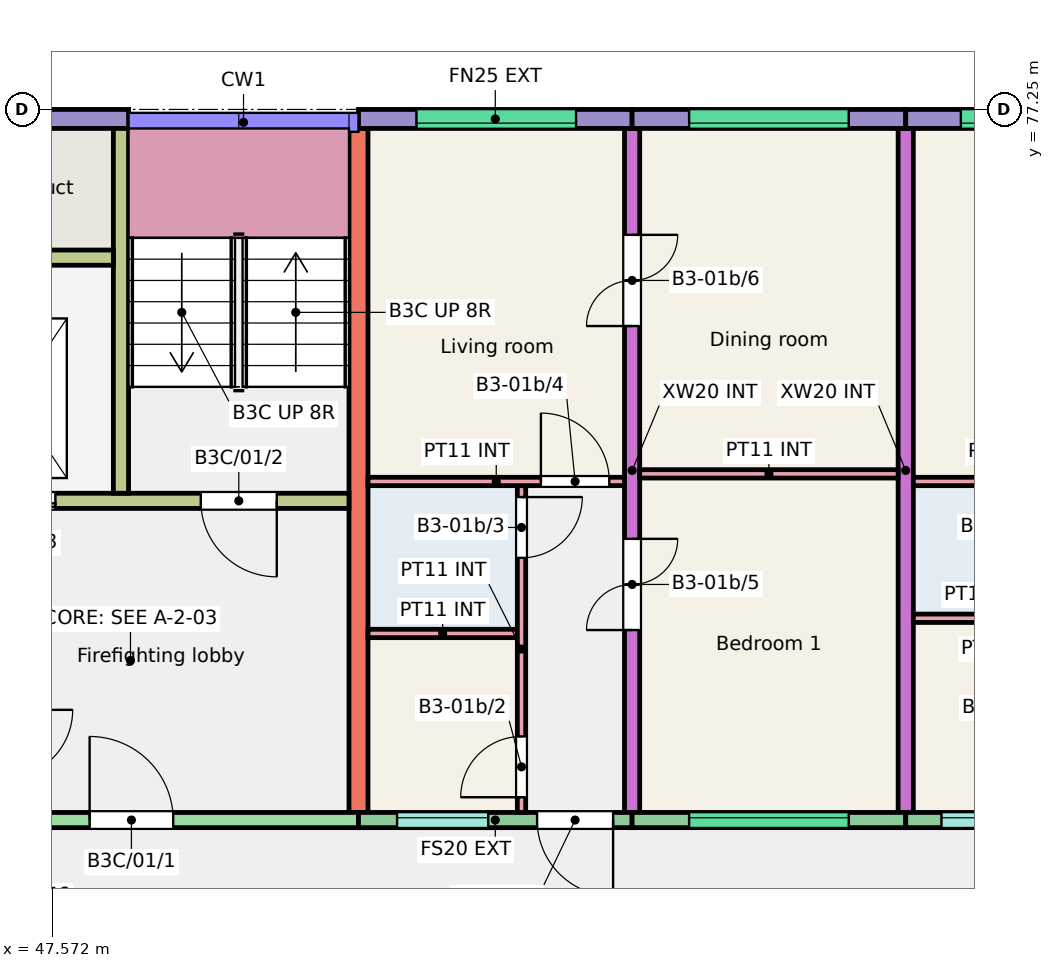
"""IFC4 building model, lengths in metres.
Left out: names, types, materials, properties, quantities, classifications, styles, units other than length and angle.
Written with IfcOpenShell. Run it as: python <this file> out.ifc"""

import sys

from ifc_helpers import new_model, si_unit, direction, frame, frame_2d, origin, place, context, subcontext, project, spatial, rectangle, extrude, element, fill, save


model = new_model("IFC4")
c1 = context("Model", 3, precision=1e-05, world=origin(), true_north=direction((0.0, 1.0)))
c2 = subcontext(c1, "Body", "Model", "MODEL_VIEW")
j1 = project(units=[si_unit("LENGTHUNIT", "METRE"), si_unit("PLANEANGLEUNIT", "RADIAN")], contexts=[c1])
p1 = place(None, origin())
s1 = spatial("IfcSite", under=j1, at=p1, CompositionType="ELEMENT")
p2 = place(p1, origin())
s2 = spatial("IfcBuilding", under=s1, at=p2, CompositionType="ELEMENT")
p3 = place(p2, frame((0.0, 0.0, 3.0)))
s3 = spatial("IfcBuildingStorey", under=s2, at=p3, CompositionType="ELEMENT", Elevation=3.0)
p4 = place(p3, frame((51.6, 68.0, 0.0), z_axis=(0.0, 0.0, 1.0), x_axis=(0.0, 1.0, 0.0)))
e1 = element("IfcWall", 1, at=p4, inside=s3, PredefinedType="SHEAR", context=c2, shape_type="SweptSolid", body=[
    extrude(rectangle(XDim=9.0, YDim=0.25, at=frame_2d((4.5, 0.0))), origin(), (0.0, 0.0, 1.0), 3.0),
])
p5 = place(p3, frame((55.2, 68.0, 0.0), z_axis=(0.0, 0.0, 1.0), x_axis=(0.0, 1.0, 0.0)))
e2 = element("IfcWall", 2, at=p5, inside=s3, PredefinedType="SHEAR", context=c2, shape_type="SweptSolid", body=[
    extrude(rectangle(XDim=9.0, YDim=0.2, at=frame_2d((4.5, 0.0))), origin(), (0.0, 0.0, 1.0), 3.0),
])
p6 = place(p5, frame((2.4, 0.0, 0.0)))
e3 = element("IfcOpeningElement", 3, at=p6, cuts=e2, PredefinedType="OPENING", context=c2, shape_type="SweptSolid", body=[
    extrude(rectangle(XDim=1.2, YDim=2.1, at=frame_2d((0.6, 1.05))), frame((0.0, 0.11, 0.0), z_axis=(0.0, -1.0, 0.0), x_axis=(1.0, 0.0, 0.0)), (0.0, 0.0, 1.0), 0.22),
])
p7 = place(p5, frame((6.4, 0.0, 0.0)))
e4 = element("IfcOpeningElement", 4, at=p7, cuts=e2, PredefinedType="OPENING", context=c2, shape_type="SweptSolid", body=[
    extrude(rectangle(XDim=1.2, YDim=2.1, at=frame_2d((0.6, 1.05))), frame((0.0, 0.11, 0.0), z_axis=(0.0, -1.0, 0.0), x_axis=(1.0, 0.0, 0.0)), (0.0, 0.0, 1.0), 0.22),
])
p8 = place(p3, frame((58.8, 68.0, 0.0), z_axis=(0.0, 0.0, 1.0), x_axis=(0.0, 1.0, 0.0)))
e5 = element("IfcWall", 5, at=p8, inside=s3, PredefinedType="SHEAR", context=c2, shape_type="SweptSolid", body=[
    extrude(rectangle(XDim=9.0, YDim=0.2, at=frame_2d((4.5, 0.0))), origin(), (0.0, 0.0, 1.0), 3.0),
])
p9 = place(p3, frame((45.6, 77.125, 0.0), z_axis=(0.0, 0.0, 1.0), x_axis=(1.0, 0.0, 0.0)))
e6 = element("IfcWall", 6, at=p9, inside=s3, PredefinedType="SOLIDWALL", context=c2, shape_type="SweptSolid", body=[
    extrude(rectangle(XDim=2.975, YDim=0.25, at=frame_2d((1.487, 0.0))), origin(), (0.0, 0.0, 1.0), 3.0),
])
p10 = place(p3, frame((45.75, 67.9, 0.0), z_axis=(0.0, 0.0, 1.0), x_axis=(1.0, 0.0, 0.0)))
e7 = element("IfcWall", 7, at=p10, inside=s3, PredefinedType="SHEAR", context=c2, shape_type="SweptSolid", body=[
    extrude(rectangle(XDim=5.85, YDim=0.2, at=frame_2d((2.925, 0.0))), origin(), (0.0, 0.0, 1.0), 3.0),
])
p11 = place(p10, frame((2.312, 0.0, 0.0)))
e8 = element("IfcOpeningElement", 8, at=p11, cuts=e7, PredefinedType="OPENING", context=c2, shape_type="SweptSolid", body=[
    extrude(rectangle(XDim=1.1, YDim=2.1, at=frame_2d((0.55, 1.05))), frame((0.0, 0.11, 0.0), z_axis=(0.0, -1.0, 0.0), x_axis=(1.0, 0.0, 0.0)), (0.0, 0.0, 1.0), 0.22),
])
p12 = place(p3, frame((45.75, 72.1, 0.0), z_axis=(0.0, 0.0, 1.0), x_axis=(1.0, 0.0, 0.0)))
e9 = element("IfcWall", 9, at=p12, inside=s3, PredefinedType="SHEAR", context=c2, shape_type="SweptSolid", body=[
    extrude(rectangle(XDim=5.725, YDim=0.2, at=frame_2d((2.863, 0.0))), origin(), (0.0, 0.0, 1.0), 3.0),
])
p13 = place(p12, frame((3.775, 0.0, 0.0)))
e10 = element("IfcOpeningElement", 10, at=p13, cuts=e9, PredefinedType="OPENING", context=c2, shape_type="SweptSolid", body=[
    extrude(rectangle(XDim=1.0, YDim=2.1, at=frame_2d((0.5, 1.05))), frame((0.0, 0.11, 0.0), z_axis=(0.0, -1.0, 0.0), x_axis=(1.0, 0.0, 0.0)), (0.0, 0.0, 1.0), 0.22),
])
p14 = place(p12, frame((0.762, 0.0, 0.0)))
e11 = element("IfcOpeningElement", 11, at=p14, cuts=e9, PredefinedType="OPENING", context=c2, shape_type="SweptSolid", body=[
    extrude(rectangle(XDim=1.1, YDim=2.1, at=frame_2d((0.55, 1.05))), frame((0.0, 0.11, 0.0), z_axis=(0.0, -1.0, 0.0), x_axis=(1.0, 0.0, 0.0)), (0.0, 0.0, 1.0), 0.22),
])
p15 = place(p3, frame((48.475, 72.2, 0.0), z_axis=(0.0, 0.0, 1.0), x_axis=(0.0, 1.0, 0.0)))
e12 = element("IfcWall", 12, at=p15, inside=s3, PredefinedType="SHEAR", context=c2, shape_type="SweptSolid", body=[
    extrude(rectangle(XDim=4.8, YDim=0.2, at=frame_2d((2.4, 0.0))), origin(), (0.0, 0.0, 1.0), 3.0),
])
p16 = place(p3, frame((45.75, 75.3, 0.0), z_axis=(0.0, 0.0, 1.0), x_axis=(1.0, 0.0, 0.0)))
e13 = element("IfcWall", 13, at=p16, inside=s3, PredefinedType="SHEAR", context=c2, shape_type="SweptSolid", body=[
    extrude(rectangle(XDim=2.625, YDim=0.2, at=frame_2d((1.312, 0.0))), origin(), (0.0, 0.0, 1.0), 3.0),
])
p17 = place(p3, frame((51.6, 77.125, 0.0), z_axis=(0.0, 0.0, 1.0), x_axis=(1.0, 0.0, 0.0)))
e14 = element("IfcWall", 14, at=p17, inside=s3, PredefinedType="SOLIDWALL", context=c2, shape_type="SweptSolid", body=[
    extrude(rectangle(XDim=3.6, YDim=0.25, at=frame_2d((1.8, 0.0))), origin(), (0.0, 0.0, 1.0), 3.0),
])
p18 = place(p17, frame((0.762, 0.0, 1.2)))
e15 = element("IfcOpeningElement", 15, at=p18, cuts=e14, PredefinedType="OPENING", context=c2, shape_type="SweptSolid", body=[
    extrude(rectangle(XDim=2.1, YDim=1.2, at=frame_2d((1.05, 0.6))), frame((0.0, 0.135, 0.0), z_axis=(0.0, -1.0, 0.0), x_axis=(1.0, 0.0, 0.0)), (0.0, 0.0, 1.0), 0.27),
])
p19 = place(p3, frame((51.6, 67.9, 0.0), z_axis=(0.0, 0.0, 1.0), x_axis=(1.0, 0.0, 0.0)))
e16 = element("IfcWall", 16, at=p19, inside=s3, PredefinedType="SOLIDWALL", context=c2, shape_type="SweptSolid", body=[
    extrude(rectangle(XDim=3.6, YDim=0.2, at=frame_2d((1.8, 0.0))), origin(), (0.0, 0.0, 1.0), 3.0),
])
p20 = place(p19, frame((0.508, 0.0, 1.1)))
e17 = element("IfcOpeningElement", 17, at=p20, cuts=e16, PredefinedType="OPENING", context=c2, shape_type="SweptSolid", body=[
    extrude(rectangle(XDim=1.2, YDim=1.3, at=frame_2d((0.6, 0.65))), frame((0.0, 0.11, 0.0), z_axis=(0.0, -1.0, 0.0), x_axis=(1.0, 0.0, 0.0)), (0.0, 0.0, 1.0), 0.22),
])
p21 = place(p19, frame((2.35, 0.0, 0.0)))
e18 = element("IfcOpeningElement", 18, at=p21, cuts=e16, PredefinedType="OPENING", context=c2, shape_type="SweptSolid", body=[
    extrude(rectangle(XDim=1.0, YDim=2.1, at=frame_2d((0.5, 1.05))), frame((0.0, 0.11, 0.0), z_axis=(0.0, -1.0, 0.0), x_axis=(1.0, 0.0, 0.0)), (0.0, 0.0, 1.0), 0.22),
])
p22 = place(p3, frame((55.2, 77.125, 0.0), z_axis=(0.0, 0.0, 1.0), x_axis=(1.0, 0.0, 0.0)))
e19 = element("IfcWall", 19, at=p22, inside=s3, PredefinedType="SOLIDWALL", context=c2, shape_type="SweptSolid", body=[
    extrude(rectangle(XDim=3.6, YDim=0.25, at=frame_2d((1.8, 0.0))), origin(), (0.0, 0.0, 1.0), 3.0),
])
p23 = place(p22, frame((0.75, 0.0, 1.2)))
e20 = element("IfcOpeningElement", 20, at=p23, cuts=e19, PredefinedType="OPENING", context=c2, shape_type="SweptSolid", body=[
    extrude(rectangle(XDim=2.1, YDim=1.2, at=frame_2d((1.05, 0.6))), frame((0.0, 0.135, 0.0), z_axis=(0.0, -1.0, 0.0), x_axis=(1.0, 0.0, 0.0)), (0.0, 0.0, 1.0), 0.27),
])
p24 = place(p3, frame((55.2, 67.9, 0.0), z_axis=(0.0, 0.0, 1.0), x_axis=(1.0, 0.0, 0.0)))
e21 = element("IfcWall", 21, at=p24, inside=s3, PredefinedType="SOLIDWALL", context=c2, shape_type="SweptSolid", body=[
    extrude(rectangle(XDim=3.6, YDim=0.2, at=frame_2d((1.8, 0.0))), origin(), (0.0, 0.0, 1.0), 3.0),
])
p25 = place(p24, frame((0.75, 0.0, 1.2)))
e22 = element("IfcOpeningElement", 22, at=p25, cuts=e21, PredefinedType="OPENING", context=c2, shape_type="SweptSolid", body=[
    extrude(rectangle(XDim=2.1, YDim=1.2, at=frame_2d((1.05, 0.6))), frame((0.0, 0.11, 0.0), z_axis=(0.0, -1.0, 0.0), x_axis=(1.0, 0.0, 0.0)), (0.0, 0.0, 1.0), 0.22),
])
p26 = place(p3, frame((58.8, 77.125, 0.0), z_axis=(0.0, 0.0, 1.0), x_axis=(1.0, 0.0, 0.0)))
e23 = element("IfcWall", 23, at=p26, inside=s3, PredefinedType="SOLIDWALL", context=c2, shape_type="SweptSolid", body=[
    extrude(rectangle(XDim=3.6, YDim=0.25, at=frame_2d((1.8, 0.0))), origin(), (0.0, 0.0, 1.0), 3.0),
])
p27 = place(p26, frame((0.725, 0.0, 1.2)))
e24 = element("IfcOpeningElement", 24, at=p27, cuts=e23, PredefinedType="OPENING", context=c2, shape_type="SweptSolid", body=[
    extrude(rectangle(XDim=2.1, YDim=1.2, at=frame_2d((1.05, 0.6))), frame((0.0, 0.135, 0.0), z_axis=(0.0, -1.0, 0.0), x_axis=(1.0, 0.0, 0.0)), (0.0, 0.0, 1.0), 0.27),
])
p28 = place(p3, frame((58.8, 67.9, 0.0), z_axis=(0.0, 0.0, 1.0), x_axis=(1.0, 0.0, 0.0)))
e25 = element("IfcWall", 25, at=p28, inside=s3, PredefinedType="SOLIDWALL", context=c2, shape_type="SweptSolid", body=[
    extrude(rectangle(XDim=3.45, YDim=0.2, at=frame_2d((1.725, 0.0))), origin(), (0.0, 0.0, 1.0), 3.0),
])
p29 = place(p28, frame((0.47, 0.0, 1.1)))
e26 = element("IfcOpeningElement", 26, at=p29, cuts=e25, PredefinedType="OPENING", context=c2, shape_type="SweptSolid", body=[
    extrude(rectangle(XDim=1.2, YDim=1.3, at=frame_2d((0.6, 0.65))), frame((0.0, 0.11, 0.0), z_axis=(0.0, -1.0, 0.0), x_axis=(1.0, 0.0, 0.0)), (0.0, 0.0, 1.0), 0.22),
])
p30 = place(p28, frame((2.3, 0.0, 0.0)))
e27 = element("IfcOpeningElement", 27, at=p30, cuts=e25, PredefinedType="OPENING", context=c2, shape_type="SweptSolid", body=[
    extrude(rectangle(XDim=1.0, YDim=2.1, at=frame_2d((0.5, 1.05))), frame((0.0, 0.11, 0.0), z_axis=(0.0, -1.0, 0.0), x_axis=(1.0, 0.0, 0.0)), (0.0, 0.0, 1.0), 0.22),
])
p31 = place(p3, frame((58.9, 70.555, 0.0), z_axis=(0.0, 0.0, 1.0), x_axis=(1.0, 0.0, 0.0)))
e28 = element("IfcWall", 28, at=p31, inside=s3, PredefinedType="PARTITIONING", context=c2, shape_type="SweptSolid", body=[
    extrude(rectangle(XDim=1.94, YDim=0.11, at=frame_2d((0.97, 0.0))), origin(), (0.0, 0.0, 1.0), 2.8),
])
p32 = place(p3, frame((58.9, 72.355, 0.0), z_axis=(0.0, 0.0, 1.0), x_axis=(1.0, 0.0, 0.0)))
e29 = element("IfcWall", 29, at=p32, inside=s3, PredefinedType="PARTITIONING", context=c2, shape_type="SweptSolid", body=[
    extrude(rectangle(XDim=3.35, YDim=0.11, at=frame_2d((1.675, 0.0))), origin(), (0.0, 0.0, 1.0), 2.8),
])
p33 = place(p32, frame((2.25, 0.0, 0.0)))
e30 = element("IfcOpeningElement", 30, at=p33, cuts=e29, PredefinedType="OPENING", context=c2, shape_type="SweptSolid", body=[
    extrude(rectangle(XDim=0.9, YDim=2.1, at=frame_2d((0.45, 1.05))), frame((0.0, 0.065, 0.0), z_axis=(0.0, -1.0, 0.0), x_axis=(1.0, 0.0, 0.0)), (0.0, 0.0, 1.0), 0.13),
])
p34 = place(p3, frame((51.725, 70.355, 0.0), z_axis=(0.0, 0.0, 1.0), x_axis=(1.0, 0.0, 0.0)))
e31 = element("IfcWall", 31, at=p34, inside=s3, PredefinedType="PARTITIONING", context=c2, shape_type="SweptSolid", body=[
    extrude(rectangle(XDim=1.965, YDim=0.11, at=frame_2d((0.982, 0.0))), origin(), (0.0, 0.0, 1.0), 2.8),
])
p35 = place(p3, frame((53.745, 68.0, 0.0), z_axis=(0.0, 0.0, 1.0), x_axis=(0.0, 1.0, 0.0)))
e32 = element("IfcWall", 32, at=p35, inside=s3, PredefinedType="PARTITIONING", context=c2, shape_type="SweptSolid", body=[
    extrude(rectangle(XDim=4.3, YDim=0.11, at=frame_2d((2.15, 0.0))), origin(), (0.0, 0.0, 1.0), 2.8),
])
p36 = place(p35, frame((0.2, 0.0, 0.0)))
e33 = element("IfcOpeningElement", 33, at=p36, cuts=e32, PredefinedType="OPENING", context=c2, shape_type="SweptSolid", body=[
    extrude(rectangle(XDim=0.8, YDim=2.1, at=frame_2d((0.4, 1.05))), frame((0.0, 0.065, 0.0), z_axis=(0.0, -1.0, 0.0), x_axis=(1.0, 0.0, 0.0)), (0.0, 0.0, 1.0), 0.13),
])
p37 = place(p35, frame((3.35, 0.0, 0.0)))
e34 = element("IfcOpeningElement", 34, at=p37, cuts=e32, PredefinedType="OPENING", context=c2, shape_type="SweptSolid", body=[
    extrude(rectangle(XDim=0.8, YDim=2.1, at=frame_2d((0.4, 1.05))), frame((0.0, 0.065, 0.0), z_axis=(0.0, -1.0, 0.0), x_axis=(1.0, 0.0, 0.0)), (0.0, 0.0, 1.0), 0.13),
])
p38 = place(p3, frame((51.725, 72.355, 0.0), z_axis=(0.0, 0.0, 1.0), x_axis=(1.0, 0.0, 0.0)))
e35 = element("IfcWall", 35, at=p38, inside=s3, PredefinedType="PARTITIONING", context=c2, shape_type="SweptSolid", body=[
    extrude(rectangle(XDim=3.375, YDim=0.11, at=frame_2d((1.688, 0.0))), origin(), (0.0, 0.0, 1.0), 2.8),
])
p39 = place(p38, frame((2.275, 0.0, 0.0)))
e36 = element("IfcOpeningElement", 36, at=p39, cuts=e35, PredefinedType="OPENING", context=c2, shape_type="SweptSolid", body=[
    extrude(rectangle(XDim=0.9, YDim=2.1, at=frame_2d((0.45, 1.05))), frame((0.0, 0.065, 0.0), z_axis=(0.0, -1.0, 0.0), x_axis=(1.0, 0.0, 0.0)), (0.0, 0.0, 1.0), 0.13),
])
p40 = place(p3, frame((55.3, 72.455, 0.0), z_axis=(0.0, 0.0, 1.0), x_axis=(1.0, 0.0, 0.0)))
e37 = element("IfcWall", 37, at=p40, inside=s3, PredefinedType="PARTITIONING", context=c2, shape_type="SweptSolid", body=[
    extrude(rectangle(XDim=3.4, YDim=0.11, at=frame_2d((1.7, 0.0))), origin(), (0.0, 0.0, 1.0), 2.8),
])
p41 = place(p29, origin())
e38 = element("IfcWindow", 38, at=p41, inside=s3, PartitioningType="SINGLE_PANEL", PredefinedType="WINDOW", context=c2, shape_type="SweptSolid", body=[
    extrude(rectangle(XDim=1.2, YDim=1.3, at=frame_2d((0.6, 0.65))), frame((0.0, 0.06, 0.0), z_axis=(0.0, -1.0, 0.0), x_axis=(1.0, 0.0, 0.0)), (0.0, 0.0, 1.0), 0.06),
])
fill(e26, e38)
p42 = place(p27, origin())
e39 = element("IfcWindow", 39, at=p42, inside=s3, PartitioningType="SINGLE_PANEL", PredefinedType="WINDOW", context=c2, shape_type="SweptSolid", body=[
    extrude(rectangle(XDim=2.1, YDim=1.2, at=frame_2d((1.05, 0.6))), frame((0.0, -0.025, 0.0), z_axis=(0.0, -1.0, 0.0), x_axis=(1.0, 0.0, 0.0)), (0.0, 0.0, 1.0), 0.06),
])
fill(e24, e39)
p43 = place(p25, origin())
e40 = element("IfcWindow", 40, at=p43, inside=s3, PartitioningType="SINGLE_PANEL", PredefinedType="WINDOW", context=c2, shape_type="SweptSolid", body=[
    extrude(rectangle(XDim=2.1, YDim=1.2, at=frame_2d((1.05, 0.6))), frame((0.0, 0.06, 0.0), z_axis=(0.0, -1.0, 0.0), x_axis=(1.0, 0.0, 0.0)), (0.0, 0.0, 1.0), 0.06),
])
fill(e22, e40)
p44 = place(p23, origin())
e41 = element("IfcWindow", 41, at=p44, inside=s3, PartitioningType="SINGLE_PANEL", PredefinedType="WINDOW", context=c2, shape_type="SweptSolid", body=[
    extrude(rectangle(XDim=2.1, YDim=1.2, at=frame_2d((1.05, 0.6))), frame((0.0, -0.025, 0.0), z_axis=(0.0, -1.0, 0.0), x_axis=(1.0, 0.0, 0.0)), (0.0, 0.0, 1.0), 0.06),
])
fill(e20, e41)
p45 = place(p20, origin())
e42 = element("IfcWindow", 42, at=p45, inside=s3, PartitioningType="SINGLE_PANEL", PredefinedType="WINDOW", context=c2, shape_type="SweptSolid", body=[
    extrude(rectangle(XDim=1.2, YDim=1.3, at=frame_2d((0.6, 0.65))), frame((0.0, 0.06, 0.0), z_axis=(0.0, -1.0, 0.0), x_axis=(1.0, 0.0, 0.0)), (0.0, 0.0, 1.0), 0.06),
])
fill(e17, e42)
p46 = place(p18, origin())
e43 = element("IfcWindow", 43, at=p46, inside=s3, PartitioningType="SINGLE_PANEL", PredefinedType="WINDOW", context=c2, shape_type="SweptSolid", body=[
    extrude(rectangle(XDim=2.1, YDim=1.2, at=frame_2d((1.05, 0.6))), frame((0.0, -0.025, 0.0), z_axis=(0.0, -1.0, 0.0), x_axis=(1.0, 0.0, 0.0)), (0.0, 0.0, 1.0), 0.06),
])
fill(e15, e43)
p47 = place(p21, origin())
e44 = element("IfcDoor", 44, at=p47, inside=s3, OperationType="SINGLE_SWING_RIGHT", PredefinedType="DOOR", context=c2, shape_type="SweptSolid", body=[
    extrude(rectangle(XDim=1.0, YDim=2.1, at=frame_2d((0.5, 1.05))), frame((0.0, 0.025, 0.0), z_axis=(0.0, -1.0, 0.0), x_axis=(1.0, 0.0, 0.0)), (0.0, 0.0, 1.0), 0.05),
])
fill(e18, e44)
p48 = place(p36, origin())
e45 = element("IfcDoor", 45, at=p48, inside=s3, OperationType="SINGLE_SWING_LEFT", PredefinedType="DOOR", context=c2, shape_type="SweptSolid", body=[
    extrude(rectangle(XDim=0.8, YDim=2.1, at=frame_2d((0.4, 1.05))), frame((0.0, 0.025, 0.0), z_axis=(0.0, -1.0, 0.0), x_axis=(1.0, 0.0, 0.0)), (0.0, 0.0, 1.0), 0.05),
])
fill(e33, e45)
p49 = place(p37, origin())
e46 = element("IfcDoor", 46, at=p49, inside=s3, OperationType="SINGLE_SWING_RIGHT", PredefinedType="DOOR", context=c2, shape_type="SweptSolid", body=[
    extrude(rectangle(XDim=0.8, YDim=2.1, at=frame_2d((0.4, 1.05))), frame((0.0, 0.025, 0.0), z_axis=(0.0, -1.0, 0.0), x_axis=(1.0, 0.0, 0.0)), (0.0, 0.0, 1.0), 0.05),
])
fill(e34, e46)
p50 = place(p39, origin())
e47 = element("IfcDoor", 47, at=p50, inside=s3, OperationType="SINGLE_SWING_LEFT", PredefinedType="DOOR", context=c2, shape_type="SweptSolid", body=[
    extrude(rectangle(XDim=0.9, YDim=2.1, at=frame_2d((0.45, 1.05))), frame((0.0, 0.025, 0.0), z_axis=(0.0, -1.0, 0.0), x_axis=(1.0, 0.0, 0.0)), (0.0, 0.0, 1.0), 0.05),
])
fill(e36, e47)
p51 = place(p6, origin())
e48 = element("IfcDoor", 48, at=p51, inside=s3, OperationType="DOUBLE_DOOR_SINGLE_SWING", PredefinedType="DOOR", context=c2, shape_type="SweptSolid", body=[
    extrude(rectangle(XDim=1.2, YDim=2.1, at=frame_2d((0.6, 1.05))), frame((0.0, 0.025, 0.0), z_axis=(0.0, -1.0, 0.0), x_axis=(1.0, 0.0, 0.0)), (0.0, 0.0, 1.0), 0.05),
])
fill(e3, e48)
p52 = place(p7, origin())
e49 = element("IfcDoor", 49, at=p52, inside=s3, OperationType="DOUBLE_DOOR_SINGLE_SWING", PredefinedType="DOOR", context=c2, shape_type="SweptSolid", body=[
    extrude(rectangle(XDim=1.2, YDim=2.1, at=frame_2d((0.6, 1.05))), frame((0.0, 0.025, 0.0), z_axis=(0.0, -1.0, 0.0), x_axis=(1.0, 0.0, 0.0)), (0.0, 0.0, 1.0), 0.05),
])
fill(e4, e49)
p53 = place(p11, origin())
e50 = element("IfcDoor", 50, at=p53, inside=s3, OperationType="SINGLE_SWING_LEFT", PredefinedType="DOOR", context=c2, shape_type="SweptSolid", body=[
    extrude(rectangle(XDim=1.1, YDim=2.1, at=frame_2d((0.55, 1.05))), frame((0.0, 0.025, 0.0), z_axis=(0.0, -1.0, 0.0), x_axis=(1.0, 0.0, 0.0)), (0.0, 0.0, 1.0), 0.05),
])
fill(e8, e50)
p54 = place(p13, origin())
e51 = element("IfcDoor", 51, at=p54, inside=s3, OperationType="SINGLE_SWING_RIGHT", PredefinedType="DOOR", context=c2, shape_type="SweptSolid", body=[
    extrude(rectangle(XDim=1.0, YDim=2.1, at=frame_2d((0.5, 1.05))), frame((0.0, 0.025, 0.0), z_axis=(0.0, -1.0, 0.0), x_axis=(1.0, 0.0, 0.0)), (0.0, 0.0, 1.0), 0.05),
])
fill(e10, e51)
p55 = place(p14, origin())
e52 = element("IfcDoor", 52, at=p55, inside=s3, OperationType="DOUBLE_DOOR_SLIDING", PredefinedType="DOOR", context=c2, shape_type="SweptSolid", body=[
    extrude(rectangle(XDim=1.1, YDim=2.1, at=frame_2d((0.55, 1.05))), frame((0.0, 0.025, 0.0), z_axis=(0.0, -1.0, 0.0), x_axis=(1.0, 0.0, 0.0)), (0.0, 0.0, 1.0), 0.05),
])
fill(e11, e52)
save(model, sys.argv[1])
